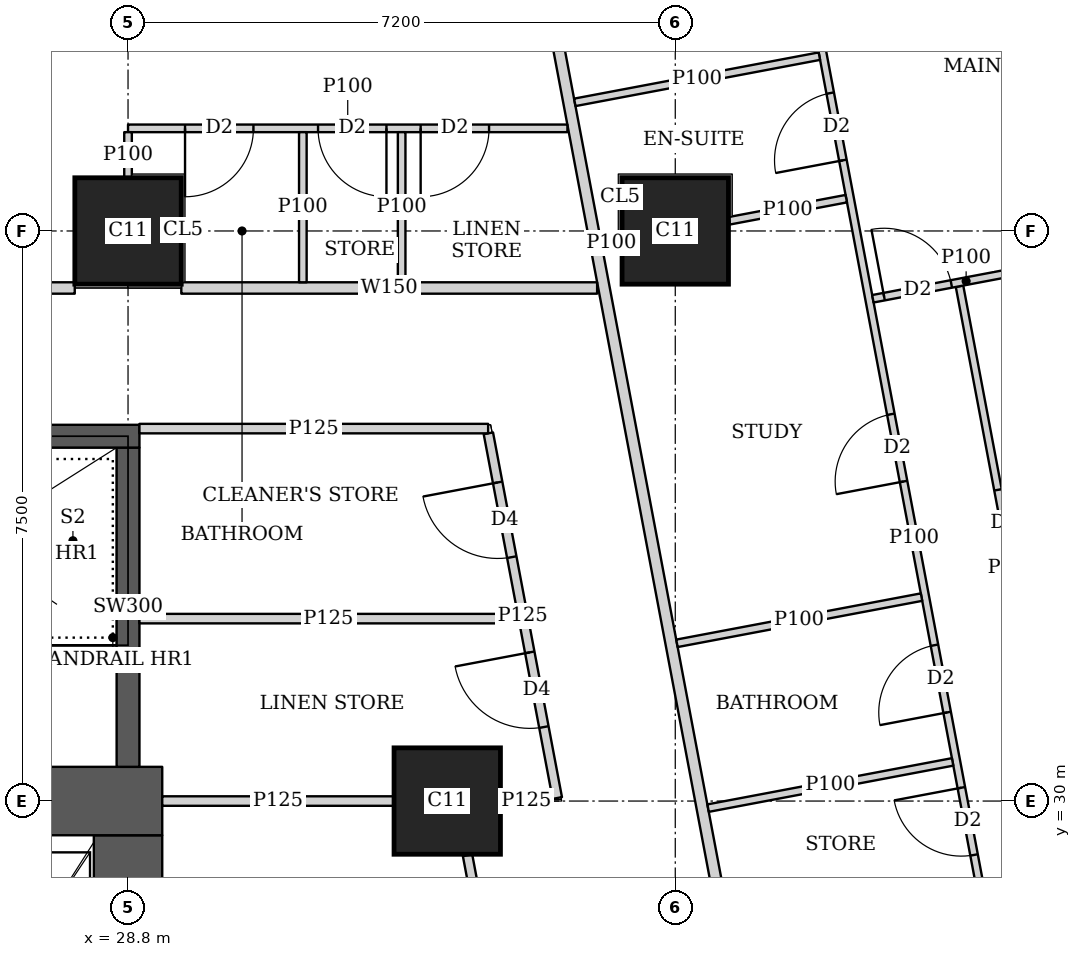
"""IFC4 building model, lengths in metres.
Left out: names, types, materials, properties, quantities, classifications, styles, units other than length and angle.
Written with IfcOpenShell. Run it as: python <this file> out.ifc"""

import sys

from ifc_helpers import new_model, si_unit, direction, frame, frame_2d, origin, origin_2d, place, context, subcontext, project, spatial, rectangle, extrude, element, fill, save


model = new_model("IFC4")
c1 = context("Model", 3, precision=1e-05, world=origin(), true_north=direction((0.0, 1.0)))
c2 = subcontext(c1, "Body", "Model", "MODEL_VIEW")
j1 = project(units=[si_unit("LENGTHUNIT", "METRE"), si_unit("PLANEANGLEUNIT", "RADIAN")], contexts=[c1])
p1 = place(None, origin())
s1 = spatial("IfcSite", under=j1, at=p1, CompositionType="ELEMENT")
p2 = place(p1, origin())
s2 = spatial("IfcBuilding", under=s1, at=p2, CompositionType="ELEMENT")
p3 = place(p2, frame((0.0, 0.0, 292.85)))
s3 = spatial("IfcBuildingStorey", under=s2, at=p3, CompositionType="ELEMENT", Elevation=292.85)
for number, where, z_axis, x_axis in (
    (1, (33.0, 30.0, 0.0), (0.0, 0.0, 1.0), (1.0, 0.0, 0.0)),
    (2, (28.8, 37.5, 0.0), (0.0, 0.0, 1.0), (1.0, 0.0, 0.0)),
    (3, (36.0, 37.5, 0.0), (0.0, 0.0, 1.0), (1.0, 0.0, 0.0)),
):
    element("IfcColumn", number, at=place(p3, frame(where, z_axis=z_axis, x_axis=x_axis)), inside=s3, PredefinedType="COLUMN", context=c2, shape_type="SweptSolid", body=[
        extrude(rectangle(XDim=1.4, YDim=1.4, at=origin_2d()), origin(), (0.0, 0.0, 1.0), 3.75),
    ])
p4 = place(p3, frame((13.95, 30.0, 0.0), z_axis=(0.0, 0.0, 1.0), x_axis=(1.0, 0.0, 0.0)))
e4 = element("IfcWall", 4, at=p4, inside=s3, PredefinedType="SHEAR", context=c2, shape_type="SweptSolid", body=[
    extrude(rectangle(XDim=15.3, YDim=0.9, at=frame_2d((7.65, 0.0))), origin(), (0.0, 0.0, 1.0), 3.75),
])
p5 = place(p4, frame((4.45, 0.0, 0.0)))
e5 = element("IfcOpeningElement", 5, at=p5, cuts=e4, PredefinedType="OPENING", context=c2, shape_type="SweptSolid", body=[
    extrude(rectangle(XDim=1.8, YDim=2.1, at=frame_2d((0.9, 1.05))), frame((0.0, 0.46, 0.0), z_axis=(0.0, -1.0, 0.0), x_axis=(1.0, 0.0, 0.0)), (0.0, 0.0, 1.0), 0.92),
])
p6 = place(p4, frame((10.7, 0.0, 0.0)))
e6 = element("IfcOpeningElement", 6, at=p6, cuts=e4, PredefinedType="OPENING", context=c2, shape_type="SweptSolid", body=[
    extrude(rectangle(XDim=1.1, YDim=2.1, at=frame_2d((0.55, 1.05))), frame((0.0, 0.46, 0.0), z_axis=(0.0, -1.0, 0.0), x_axis=(1.0, 0.0, 0.0)), (0.0, 0.0, 1.0), 0.92),
])
p7 = place(p3, frame((28.8, 15.45, 0.0), z_axis=(0.0, 0.0, 1.0), x_axis=(0.0, 1.0, 0.0)))
e7 = element("IfcWall", 7, at=p7, inside=s3, PredefinedType="SHEAR", context=c2, shape_type="SweptSolid", body=[
    extrude(rectangle(XDim=14.1, YDim=0.9, at=frame_2d((7.05, 0.0))), origin(), (0.0, 0.0, 1.0), 3.75),
])
p8 = place(p3, frame((21.45, 34.8, 0.0), z_axis=(0.0, 0.0, 1.0), x_axis=(1.0, 0.0, 0.0)))
e8 = element("IfcWall", 8, at=p8, inside=s3, PredefinedType="SHEAR", context=c2, shape_type="SweptSolid", body=[
    extrude(rectangle(XDim=7.5, YDim=0.3, at=frame_2d((3.75, 0.0))), origin(), (0.0, 0.0, 1.0), 3.75),
])
p9 = place(p8, frame((0.5, 0.0, 0.0)))
e9 = element("IfcOpeningElement", 9, at=p9, cuts=e8, PredefinedType="OPENING", context=c2, shape_type="SweptSolid", body=[
    extrude(rectangle(XDim=1.1, YDim=2.1, at=frame_2d((0.55, 1.05))), frame((0.0, 0.16, 0.0), z_axis=(0.0, -1.0, 0.0), x_axis=(1.0, 0.0, 0.0)), (0.0, 0.0, 1.0), 0.32),
])
p10 = place(p3, frame((28.8, 30.45, 0.0), z_axis=(0.0, 0.0, 1.0), x_axis=(0.0, 1.0, 0.0)))
e10 = element("IfcWall", 10, at=p10, inside=s3, PredefinedType="SHEAR", context=c2, shape_type="SweptSolid", body=[
    extrude(rectangle(XDim=4.2, YDim=0.3, at=frame_2d((2.1, 0.0))), origin(), (0.0, 0.0, 1.0), 3.75),
])
p11 = place(p3, frame((22.301, 36.75, 0.0), z_axis=(0.0, 0.0, 1.0), x_axis=(1.0, 0.0, 0.0)))
e11 = element("IfcWall", 11, at=p11, inside=s3, PredefinedType="SOLIDWALL", context=c2, shape_type="SweptSolid", body=[
    extrude(rectangle(XDim=5.798, YDim=0.15, at=frame_2d((2.899, 0.0))), origin(), (0.0, 0.0, 1.0), 3.4),
])
p12 = place(p11, frame((4.199, 0.0, 0.0)))
e12 = element("IfcOpeningElement", 12, at=p12, cuts=e11, PredefinedType="OPENING", context=c2, shape_type="SweptSolid", body=[
    extrude(rectangle(XDim=1.0, YDim=2.1, at=frame_2d((0.5, 1.05))), frame((0.0, 0.085, 0.0), z_axis=(0.0, -1.0, 0.0), x_axis=(1.0, 0.0, 0.0)), (0.0, 0.0, 1.0), 0.17),
])
p13 = place(p3, frame((29.501, 36.75, 0.0), z_axis=(0.0, 0.0, 1.0), x_axis=(1.0, 0.0, 0.0)))
e13 = element("IfcWall", 13, at=p13, inside=s3, PredefinedType="SOLIDWALL", context=c2, shape_type="SweptSolid", body=[
    extrude(rectangle(XDim=5.471, YDim=0.15, at=frame_2d((2.735, 0.0))), origin(), (0.0, 0.0, 1.0), 3.4),
])
p14 = place(p3, frame((34.036, 42.186, 0.0), z_axis=(0.0, 0.0, 1.0), x_axis=(0.185593518645, -0.9826266055, 0.0)))
e14 = element("IfcWall", 14, at=p14, inside=s3, PredefinedType="SOLIDWALL", context=c2, shape_type="SweptSolid", body=[
    extrude(rectangle(XDim=35.961, YDim=0.15, at=frame_2d((17.98, 0.0))), origin(), (0.0, 0.0, 1.0), 2.4),
])
p15 = place(p14, frame((19.345, 0.0, 0.0)))
e15 = element("IfcOpeningElement", 15, at=p15, cuts=e14, PredefinedType="OPENING", context=c2, shape_type="SweptSolid", body=[
    extrude(rectangle(XDim=1.0, YDim=2.1, at=frame_2d((0.5, 1.05))), frame((0.0, 0.085, 0.0), z_axis=(0.0, -1.0, 0.0), x_axis=(1.0, 0.0, 0.0)), (0.0, 0.0, 1.0), 0.17),
])
p16 = place(p14, frame((33.774, 0.0, 0.0)))
e16 = element("IfcOpeningElement", 16, at=p16, cuts=e14, PredefinedType="OPENING", context=c2, shape_type="SweptSolid", body=[
    extrude(rectangle(XDim=1.0, YDim=2.1, at=frame_2d((0.5, 1.05))), frame((0.0, 0.085, 0.0), z_axis=(0.0, -1.0, 0.0), x_axis=(1.0, 0.0, 0.0)), (0.0, 0.0, 1.0), 0.17),
])
p17 = place(p3, frame((41.054, 37.072, 0.0), z_axis=(0.0, 0.0, 1.0), x_axis=(-0.982579896219, -0.185840650951, 0.0)))
e17 = element("IfcWall", 17, at=p17, inside=s3, PredefinedType="PARTITIONING", context=c2, shape_type="SweptSolid", body=[
    extrude(rectangle(XDim=2.497, YDim=0.1, at=frame_2d((1.249, 0.0))), origin(), (0.0, 0.0, 1.0), 3.4),
])
p18 = place(p17, frame((1.447, 0.0, 0.0)))
e18 = element("IfcOpeningElement", 18, at=p18, cuts=e17, PredefinedType="OPENING", context=c2, shape_type="SweptSolid", body=[
    extrude(rectangle(XDim=0.9, YDim=2.1, at=frame_2d((0.45, 1.05))), frame((0.0, 0.06, 0.0), z_axis=(0.0, -1.0, 0.0), x_axis=(1.0, 0.0, 0.0)), (0.0, 0.0, 1.0), 0.12),
])
p19 = place(p3, frame((37.896, 39.8, 0.0), z_axis=(0.0, 0.0, 1.0), x_axis=(-0.982607026909, -0.185697147715, 0.0)))
e19 = element("IfcWall", 19, at=p19, inside=s3, PredefinedType="PARTITIONING", context=c2, shape_type="SweptSolid", body=[
    extrude(rectangle(XDim=3.275, YDim=0.1, at=frame_2d((1.637, 0.0))), origin(), (0.0, 0.0, 1.0), 3.4),
])
p20 = place(p3, frame((38.25, 37.925, 0.0), z_axis=(0.0, 0.0, 1.0), x_axis=(-0.982610209589, -0.185680305934, 0.0)))
e20 = element("IfcWall", 20, at=p20, inside=s3, PredefinedType="PARTITIONING", context=c2, shape_type="SweptSolid", body=[
    extrude(rectangle(XDim=1.567, YDim=0.1, at=frame_2d((0.784, 0.0))), origin(), (0.0, 0.0, 1.0), 3.4),
])
p21 = place(p3, frame((35.29, 37.366, 0.0), z_axis=(0.0, 0.0, 1.0), x_axis=(-0.982395465615, -0.18681313963, 0.0)))
e21 = element("IfcWall", 21, at=p21, inside=s3, PredefinedType="PARTITIONING", context=c2, shape_type="SweptSolid", body=[
    extrude(rectangle(XDim=0.263, YDim=0.1, at=frame_2d((0.131, 0.0))), origin(), (0.0, 0.0, 1.0), 3.4),
])
p22 = place(p3, frame((39.24, 32.683, 0.0), z_axis=(0.0, 0.0, 1.0), x_axis=(-0.982607026909, -0.185697147715, 0.0)))
e22 = element("IfcWall", 22, at=p22, inside=s3, PredefinedType="PARTITIONING", context=c2, shape_type="SweptSolid", body=[
    extrude(rectangle(XDim=3.275, YDim=0.1, at=frame_2d((1.637, 0.0))), origin(), (0.0, 0.0, 1.0), 3.4),
])
p23 = place(p3, frame((39.649, 30.515, 0.0), z_axis=(0.0, 0.0, 1.0), x_axis=(-0.982610347627, -0.185679575441, 0.0)))
e23 = element("IfcWall", 23, at=p23, inside=s3, PredefinedType="PARTITIONING", context=c2, shape_type="SweptSolid", body=[
    extrude(rectangle(XDim=3.274, YDim=0.1, at=frame_2d((1.637, 0.0))), origin(), (0.0, 0.0, 1.0), 2.4),
])
p24 = place(p3, frame((37.591, 41.685, 0.0), z_axis=(0.0, 0.0, 1.0), x_axis=(0.185541820726, -0.982636368532, 0.0)))
e24 = element("IfcWall", 24, at=p24, inside=s3, PredefinedType="PARTITIONING", context=c2, shape_type="SweptSolid", body=[
    extrude(rectangle(XDim=16.735, YDim=0.1, at=frame_2d((8.367, 0.0))), origin(), (0.0, 0.0, 1.0), 2.4),
])
p25 = place(p24, frame((2.413, 0.0, 0.0)))
e25 = element("IfcOpeningElement", 25, at=p25, cuts=e24, PredefinedType="OPENING", context=c2, shape_type="SweptSolid", body=[
    extrude(rectangle(XDim=0.9, YDim=2.1, at=frame_2d((0.45, 1.05))), frame((0.0, 0.06, 0.0), z_axis=(0.0, -1.0, 0.0), x_axis=(1.0, 0.0, 0.0)), (0.0, 0.0, 1.0), 0.12),
])
p26 = place(p24, frame((6.713, 0.0, 0.0)))
e26 = element("IfcOpeningElement", 26, at=p26, cuts=e24, PredefinedType="OPENING", context=c2, shape_type="SweptSolid", body=[
    extrude(rectangle(XDim=0.9, YDim=2.1, at=frame_2d((0.45, 1.05))), frame((0.0, 0.06, 0.0), z_axis=(0.0, -1.0, 0.0), x_axis=(1.0, 0.0, 0.0)), (0.0, 0.0, 1.0), 0.12),
])
p27 = place(p24, frame((9.805, 0.0, 0.0)))
e27 = element("IfcOpeningElement", 27, at=p27, cuts=e24, PredefinedType="OPENING", context=c2, shape_type="SweptSolid", body=[
    extrude(rectangle(XDim=0.9, YDim=2.1, at=frame_2d((0.45, 1.05))), frame((0.0, 0.06, 0.0), z_axis=(0.0, -1.0, 0.0), x_axis=(1.0, 0.0, 0.0)), (0.0, 0.0, 1.0), 0.12),
])
p28 = place(p24, frame((11.713, 0.0, 0.0)))
e28 = element("IfcOpeningElement", 28, at=p28, cuts=e24, PredefinedType="OPENING", context=c2, shape_type="SweptSolid", body=[
    extrude(rectangle(XDim=0.9, YDim=2.1, at=frame_2d((0.45, 1.05))), frame((0.0, 0.06, 0.0), z_axis=(0.0, -1.0, 0.0), x_axis=(1.0, 0.0, 0.0)), (0.0, 0.0, 1.0), 0.12),
])
p29 = place(p24, frame((14.426, 0.0, 0.0)))
e29 = element("IfcOpeningElement", 29, at=p29, cuts=e24, PredefinedType="OPENING", context=c2, shape_type="SweptSolid", body=[
    extrude(rectangle(XDim=0.9, YDim=2.1, at=frame_2d((0.45, 1.05))), frame((0.0, 0.06, 0.0), z_axis=(0.0, -1.0, 0.0), x_axis=(1.0, 0.0, 0.0)), (0.0, 0.0, 1.0), 0.12),
])
p30 = place(p3, frame((39.74, 36.773, 0.0), z_axis=(0.0, 0.0, 1.0), x_axis=(0.185583825641, -0.982628436216, 0.0)))
e30 = element("IfcWall", 30, at=p30, inside=s3, PredefinedType="PARTITIONING", context=c2, shape_type="SweptSolid", body=[
    extrude(rectangle(XDim=7.533, YDim=0.1, at=frame_2d((3.766, 0.0))), origin(), (0.0, 0.0, 1.0), 2.4),
])
p31 = place(p30, frame((2.726, 0.0, 0.0)))
e31 = element("IfcOpeningElement", 31, at=p31, cuts=e30, PredefinedType="OPENING", context=c2, shape_type="SweptSolid", body=[
    extrude(rectangle(XDim=0.9, YDim=2.1, at=frame_2d((0.45, 1.05))), frame((0.0, 0.06, 0.0), z_axis=(0.0, -1.0, 0.0), x_axis=(1.0, 0.0, 0.0)), (0.0, 0.0, 1.0), 0.12),
])
p32 = place(p30, frame((6.383, 0.0, 0.0)))
e32 = element("IfcOpeningElement", 32, at=p32, cuts=e30, PredefinedType="OPENING", context=c2, shape_type="SweptSolid", body=[
    extrude(rectangle(XDim=0.9, YDim=2.1, at=frame_2d((0.45, 1.05))), frame((0.0, 0.06, 0.0), z_axis=(0.0, -1.0, 0.0), x_axis=(1.0, 0.0, 0.0)), (0.0, 0.0, 1.0), 0.12),
])
p33 = place(p3, frame((28.8, 38.201, 0.0), z_axis=(0.0, 0.0, 1.0), x_axis=(0.0, 1.0, 0.0)))
e33 = element("IfcWall", 33, at=p33, inside=s3, PredefinedType="PARTITIONING", context=c2, shape_type="SweptSolid", body=[
    extrude(rectangle(XDim=0.599, YDim=0.1, at=frame_2d((0.3, 0.0))), origin(), (0.0, 0.0, 1.0), 3.4),
])
for number, where, z_axis, x_axis in (
    (34, (32.4, 36.825, 0.0), (0.0, 0.0, 1.0), (0.0, 1.0, 0.0)),
    (35, (31.1, 36.825, 0.0), (0.0, 0.0, 1.0), (0.0, 1.0, 0.0)),
):
    element("IfcWall", number, at=place(p3, frame(where, z_axis=z_axis, x_axis=x_axis)), inside=s3, PredefinedType="PARTITIONING", context=c2, shape_type="SweptSolid", body=[
        extrude(rectangle(XDim=1.975, YDim=0.1, at=frame_2d((0.988, 0.0))), origin(), (0.0, 0.0, 1.0), 3.4),
    ])
p34 = place(p3, frame((28.8, 38.85, 0.0), z_axis=(0.0, 0.0, 1.0), x_axis=(1.0, 0.0, 0.0)))
e36 = element("IfcWall", 36, at=p34, inside=s3, PredefinedType="PARTITIONING", context=c2, shape_type="SweptSolid", body=[
    extrude(rectangle(XDim=5.781, YDim=0.1, at=frame_2d((2.891, 0.0))), origin(), (0.0, 0.0, 1.0), 3.4),
])
p35 = place(p34, frame((0.75, 0.0, 0.0)))
e37 = element("IfcOpeningElement", 37, at=p35, cuts=e36, PredefinedType="OPENING", context=c2, shape_type="SweptSolid", body=[
    extrude(rectangle(XDim=0.9, YDim=2.1, at=frame_2d((0.45, 1.05))), frame((0.0, 0.06, 0.0), z_axis=(0.0, -1.0, 0.0), x_axis=(1.0, 0.0, 0.0)), (0.0, 0.0, 1.0), 0.12),
])
p36 = place(p34, frame((2.5, 0.0, 0.0)))
e38 = element("IfcOpeningElement", 38, at=p36, cuts=e36, PredefinedType="OPENING", context=c2, shape_type="SweptSolid", body=[
    extrude(rectangle(XDim=0.9, YDim=2.1, at=frame_2d((0.45, 1.05))), frame((0.0, 0.06, 0.0), z_axis=(0.0, -1.0, 0.0), x_axis=(1.0, 0.0, 0.0)), (0.0, 0.0, 1.0), 0.12),
])
p37 = place(p34, frame((3.85, 0.0, 0.0)))
e39 = element("IfcOpeningElement", 39, at=p37, cuts=e36, PredefinedType="OPENING", context=c2, shape_type="SweptSolid", body=[
    extrude(rectangle(XDim=0.9, YDim=2.1, at=frame_2d((0.45, 1.05))), frame((0.0, 0.06, 0.0), z_axis=(0.0, -1.0, 0.0), x_axis=(1.0, 0.0, 0.0)), (0.0, 0.0, 1.0), 0.12),
])
p38 = place(p3, frame((28.95, 34.9, 0.0), z_axis=(0.0, 0.0, 1.0), x_axis=(1.0, 0.0, 0.0)))
e40 = element("IfcWall", 40, at=p38, inside=s3, PredefinedType="PARTITIONING", context=c2, shape_type="SweptSolid", body=[
    extrude(rectangle(XDim=4.588, YDim=0.125, at=frame_2d((2.294, 0.0))), origin(), (0.0, 0.0, 1.0), 3.4),
])
p39 = place(p3, frame((34.448, 30.04, 0.0), z_axis=(0.0, 0.0, 1.0), x_axis=(-0.185749459238, 0.982597139418, 0.0)))
e41 = element("IfcWall", 41, at=p39, inside=s3, PredefinedType="PARTITIONING", context=c2, shape_type="SweptSolid", body=[
    extrude(rectangle(XDim=4.883, YDim=0.125, at=frame_2d((2.441, 0.0))), origin(), (0.0, 0.0, 1.0), 2.4),
])
p40 = place(p39, frame((0.95, 0.0, 0.0)))
e42 = element("IfcOpeningElement", 42, at=p40, cuts=e41, PredefinedType="OPENING", context=c2, shape_type="SweptSolid", body=[
    extrude(rectangle(XDim=1.0, YDim=2.1, at=frame_2d((0.5, 1.05))), frame((0.0, 0.073, 0.0), z_axis=(0.0, -1.0, 0.0), x_axis=(1.0, 0.0, 0.0)), (0.0, 0.0, 1.0), 0.145),
])
p41 = place(p39, frame((3.225, 0.0, 0.0)))
e43 = element("IfcOpeningElement", 43, at=p41, cuts=e41, PredefinedType="OPENING", context=c2, shape_type="SweptSolid", body=[
    extrude(rectangle(XDim=1.0, YDim=2.1, at=frame_2d((0.5, 1.05))), frame((0.0, 0.073, 0.0), z_axis=(0.0, -1.0, 0.0), x_axis=(1.0, 0.0, 0.0)), (0.0, 0.0, 1.0), 0.145),
])
p42 = place(p3, frame((35.83, 15.713, 0.0), z_axis=(0.0, 0.0, 1.0), x_axis=(-0.185534724166, 0.982637708481, 0.0)))
e44 = element("IfcWall", 44, at=p42, inside=s3, PredefinedType="PARTITIONING", context=c2, shape_type="SweptSolid", body=[
    extrude(rectangle(XDim=13.814, YDim=0.125, at=frame_2d((6.907, 0.0))), origin(), (0.0, 0.0, 1.0), 2.4),
])
p43 = place(p42, frame((5.35, 0.0, 0.0)))
e45 = element("IfcOpeningElement", 45, at=p43, cuts=e44, PredefinedType="OPENING", context=c2, shape_type="SweptSolid", body=[
    extrude(rectangle(XDim=1.0, YDim=2.1, at=frame_2d((0.5, 1.05))), frame((0.0, 0.073, 0.0), z_axis=(0.0, -1.0, 0.0), x_axis=(1.0, 0.0, 0.0)), (0.0, 0.0, 1.0), 0.145),
])
p44 = place(p3, frame((29.25, 30.0, 0.0), z_axis=(0.0, 0.0, 1.0), x_axis=(1.0, 0.0, 0.0)))
e46 = element("IfcWall", 46, at=p44, inside=s3, PredefinedType="PARTITIONING", context=c2, shape_type="SweptSolid", body=[
    extrude(rectangle(XDim=3.049, YDim=0.125, at=frame_2d((1.524, 0.0))), origin(), (0.0, 0.0, 1.0), 3.4),
])
p45 = place(p3, frame((33.701, 30.0, 0.0), z_axis=(0.0, 0.0, 1.0), x_axis=(1.0, 0.0, 0.0)))
e47 = element("IfcWall", 47, at=p45, inside=s3, PredefinedType="PARTITIONING", context=c2, shape_type="SweptSolid", body=[
    extrude(rectangle(XDim=0.679, YDim=0.125, at=frame_2d((0.339, 0.0))), origin(), (0.0, 0.0, 1.0), 2.4),
])
p46 = place(p3, frame((28.95, 32.4, 0.0), z_axis=(0.0, 0.0, 1.0), x_axis=(1.0, 0.0, 0.0)))
e48 = element("IfcWall", 48, at=p46, inside=s3, PredefinedType="PARTITIONING", context=c2, shape_type="SweptSolid", body=[
    extrude(rectangle(XDim=4.976, YDim=0.125, at=frame_2d((2.488, 0.0))), origin(), (0.0, 0.0, 1.0), 3.4),
])
p47 = place(p3, frame((23.0, 31.95, 0.0), z_axis=(0.0, 0.0, 1.0), x_axis=(1.0, 0.0, 0.0)))
e49 = element("IfcWall", 49, at=p47, inside=s3, PredefinedType="SHEAR", context=c2, shape_type="SweptSolid", body=[
    extrude(rectangle(XDim=5.8, YDim=0.2, at=frame_2d((2.9, 0.0))), origin(), (0.0, 0.0, 1.0), 3.75),
])
p48 = place(p18, origin())
e50 = element("IfcDoor", 50, at=p48, inside=s3, OperationType="SINGLE_SWING_LEFT", PredefinedType="DOOR", context=c2, shape_type="SweptSolid", body=[
    extrude(rectangle(XDim=0.9, YDim=2.1, at=frame_2d((0.45, 1.05))), frame((0.0, 0.025, 0.0), z_axis=(0.0, -1.0, 0.0), x_axis=(1.0, 0.0, 0.0)), (0.0, 0.0, 1.0), 0.05),
])
fill(e18, e50)
p49 = place(p25, origin())
e51 = element("IfcDoor", 51, at=p49, inside=s3, OperationType="SINGLE_SWING_LEFT", PredefinedType="DOOR", context=c2, shape_type="SweptSolid", body=[
    extrude(rectangle(XDim=0.9, YDim=2.1, at=frame_2d((0.45, 1.05))), frame((0.0, 0.025, 0.0), z_axis=(0.0, -1.0, 0.0), x_axis=(1.0, 0.0, 0.0)), (0.0, 0.0, 1.0), 0.05),
])
fill(e25, e51)
p50 = place(p26, origin())
e52 = element("IfcDoor", 52, at=p50, inside=s3, OperationType="SINGLE_SWING_LEFT", PredefinedType="DOOR", context=c2, shape_type="SweptSolid", body=[
    extrude(rectangle(XDim=0.9, YDim=2.1, at=frame_2d((0.45, 1.05))), frame((0.0, 0.025, 0.0), z_axis=(0.0, -1.0, 0.0), x_axis=(1.0, 0.0, 0.0)), (0.0, 0.0, 1.0), 0.05),
])
fill(e26, e52)
p51 = place(p27, origin())
e53 = element("IfcDoor", 53, at=p51, inside=s3, OperationType="SINGLE_SWING_LEFT", PredefinedType="DOOR", context=c2, shape_type="SweptSolid", body=[
    extrude(rectangle(XDim=0.9, YDim=2.1, at=frame_2d((0.45, 1.05))), frame((0.0, 0.025, 0.0), z_axis=(0.0, -1.0, 0.0), x_axis=(1.0, 0.0, 0.0)), (0.0, 0.0, 1.0), 0.05),
])
fill(e27, e53)
p52 = place(p28, origin())
e54 = element("IfcDoor", 54, at=p52, inside=s3, OperationType="SINGLE_SWING_RIGHT", PredefinedType="DOOR", context=c2, shape_type="SweptSolid", body=[
    extrude(rectangle(XDim=0.9, YDim=2.1, at=frame_2d((0.45, 1.05))), frame((0.0, 0.025, 0.0), z_axis=(0.0, -1.0, 0.0), x_axis=(1.0, 0.0, 0.0)), (0.0, 0.0, 1.0), 0.05),
])
fill(e28, e54)
p53 = place(p31, origin())
e55 = element("IfcDoor", 55, at=p53, inside=s3, OperationType="SINGLE_SWING_RIGHT", PredefinedType="DOOR", context=c2, shape_type="SweptSolid", body=[
    extrude(rectangle(XDim=0.9, YDim=2.1, at=frame_2d((0.45, 1.05))), frame((0.0, 0.025, 0.0), z_axis=(0.0, -1.0, 0.0), x_axis=(1.0, 0.0, 0.0)), (0.0, 0.0, 1.0), 0.05),
])
fill(e31, e55)
p54 = place(p35, origin())
e56 = element("IfcDoor", 56, at=p54, inside=s3, OperationType="SINGLE_SWING_RIGHT", PredefinedType="DOOR", context=c2, shape_type="SweptSolid", body=[
    extrude(rectangle(XDim=0.9, YDim=2.1, at=frame_2d((0.45, 1.05))), frame((0.0, 0.025, 0.0), z_axis=(0.0, -1.0, 0.0), x_axis=(1.0, 0.0, 0.0)), (0.0, 0.0, 1.0), 0.05),
])
fill(e37, e56)
p55 = place(p36, origin())
e57 = element("IfcDoor", 57, at=p55, inside=s3, OperationType="SINGLE_SWING_LEFT", PredefinedType="DOOR", context=c2, shape_type="SweptSolid", body=[
    extrude(rectangle(XDim=0.9, YDim=2.1, at=frame_2d((0.45, 1.05))), frame((0.0, 0.025, 0.0), z_axis=(0.0, -1.0, 0.0), x_axis=(1.0, 0.0, 0.0)), (0.0, 0.0, 1.0), 0.05),
])
fill(e38, e57)
p56 = place(p37, origin())
e58 = element("IfcDoor", 58, at=p56, inside=s3, OperationType="SINGLE_SWING_RIGHT", PredefinedType="DOOR", context=c2, shape_type="SweptSolid", body=[
    extrude(rectangle(XDim=0.9, YDim=2.1, at=frame_2d((0.45, 1.05))), frame((0.0, 0.025, 0.0), z_axis=(0.0, -1.0, 0.0), x_axis=(1.0, 0.0, 0.0)), (0.0, 0.0, 1.0), 0.05),
])
fill(e39, e58)
p57 = place(p40, origin())
e59 = element("IfcDoor", 59, at=p57, inside=s3, OperationType="SINGLE_SWING_RIGHT", PredefinedType="DOOR", context=c2, shape_type="SweptSolid", body=[
    extrude(rectangle(XDim=1.0, YDim=2.1, at=frame_2d((0.5, 1.05))), frame((0.0, 0.025, 0.0), z_axis=(0.0, -1.0, 0.0), x_axis=(1.0, 0.0, 0.0)), (0.0, 0.0, 1.0), 0.05),
])
fill(e42, e59)
p58 = place(p41, origin())
e60 = element("IfcDoor", 60, at=p58, inside=s3, OperationType="SINGLE_SWING_RIGHT", PredefinedType="DOOR", context=c2, shape_type="SweptSolid", body=[
    extrude(rectangle(XDim=1.0, YDim=2.1, at=frame_2d((0.5, 1.05))), frame((0.0, 0.025, 0.0), z_axis=(0.0, -1.0, 0.0), x_axis=(1.0, 0.0, 0.0)), (0.0, 0.0, 1.0), 0.05),
])
fill(e43, e60)
save(model, sys.argv[1])
